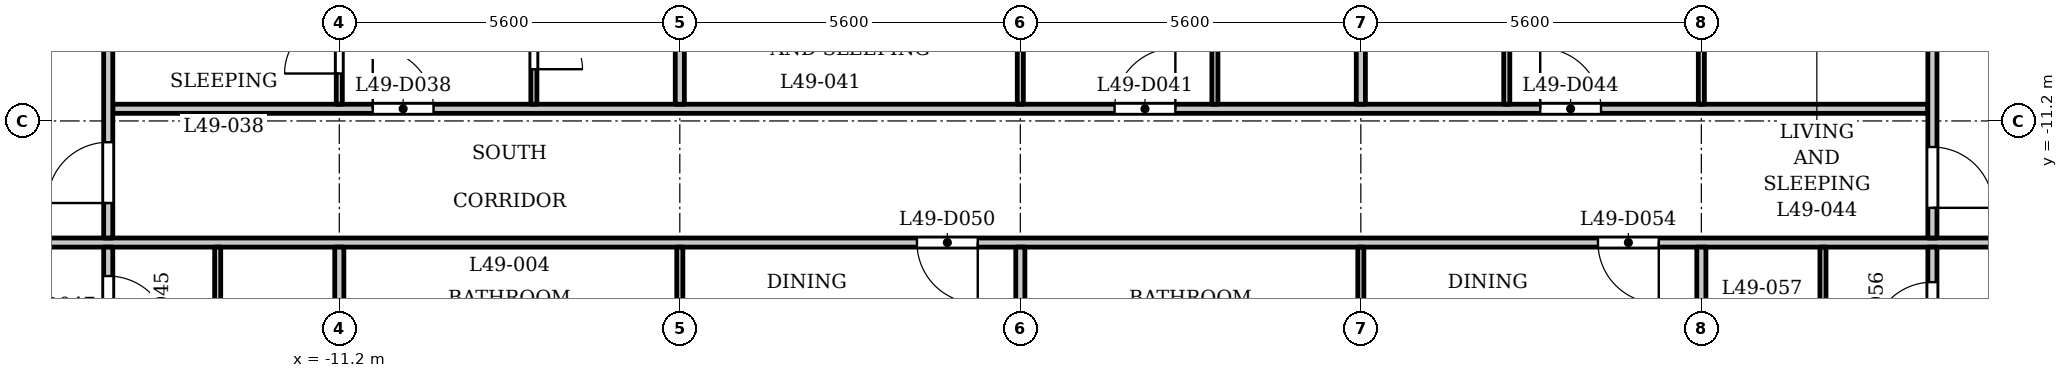
"""IFC4 building model, lengths in metres.
Left out: names, types, materials, properties, quantities, classifications, styles, units other than length and angle.
Written with IfcOpenShell. Run it as: python <this file> out.ifc"""

import sys

from ifc_helpers import new_model, si_unit, direction, frame, frame_2d, origin, place, context, subcontext, project, spatial, rectangle, extrude, element, fill, save


model = new_model("IFC4")
c1 = context("Model", 3, precision=1e-05, world=origin(), true_north=direction((0.0, 1.0)))
c2 = subcontext(c1, "Body", "Model", "MODEL_VIEW")
j1 = project(units=[si_unit("LENGTHUNIT", "METRE"), si_unit("PLANEANGLEUNIT", "RADIAN")], contexts=[c1])
p1 = place(None, origin())
s1 = spatial("IfcSite", under=j1, at=p1, CompositionType="ELEMENT")
p2 = place(p1, origin())
s2 = spatial("IfcBuilding", under=s1, at=p2, CompositionType="ELEMENT")
p3 = place(p2, frame((0.0, 0.0, 192.4)))
s3 = spatial("IfcBuildingStorey", under=s2, at=p3, CompositionType="ELEMENT", Elevation=192.4)
p4 = place(p3, frame((-17.4, -13.2, 0.0), z_axis=(0.0, 0.0, 1.0), x_axis=(1.0, 0.0, 0.0)))
e1 = element("IfcWall", 1, at=p4, inside=s3, PredefinedType="PARTITIONING", context=c2, shape_type="SweptSolid", body=[
    extrude(rectangle(XDim=34.8, YDim=0.15, at=frame_2d((17.4, 0.0))), origin(), (0.0, 0.0, 1.0), 3.2),
])
p5 = place(p4, frame((0.15, 0.0, 0.0)))
e2 = element("IfcOpeningElement", 2, at=p5, cuts=e1, PredefinedType="OPENING", context=c2, shape_type="SweptSolid", body=[
    extrude(rectangle(XDim=1.0, YDim=2.1, at=frame_2d((0.5, 1.05))), frame((0.0, 0.085, 0.0), z_axis=(0.0, -1.0, 0.0), x_axis=(1.0, 0.0, 0.0)), (0.0, 0.0, 1.0), 0.17),
])
p6 = place(p4, frame((33.55, 0.0, 0.0)))
e3 = element("IfcOpeningElement", 3, at=p6, cuts=e1, PredefinedType="OPENING", context=c2, shape_type="SweptSolid", body=[
    extrude(rectangle(XDim=1.0, YDim=2.1, at=frame_2d((0.5, 1.05))), frame((0.0, 0.085, 0.0), z_axis=(0.0, -1.0, 0.0), x_axis=(1.0, 0.0, 0.0)), (0.0, 0.0, 1.0), 0.17),
])
p7 = place(p4, frame((15.7, 0.0, 0.0)))
e4 = element("IfcOpeningElement", 4, at=p7, cuts=e1, PredefinedType="OPENING", context=c2, shape_type="SweptSolid", body=[
    extrude(rectangle(XDim=1.0, YDim=2.1, at=frame_2d((0.5, 1.05))), frame((0.0, 0.085, 0.0), z_axis=(0.0, -1.0, 0.0), x_axis=(1.0, 0.0, 0.0)), (0.0, 0.0, 1.0), 0.17),
])
p8 = place(p4, frame((26.9, 0.0, 0.0)))
e5 = element("IfcOpeningElement", 5, at=p8, cuts=e1, PredefinedType="OPENING", context=c2, shape_type="SweptSolid", body=[
    extrude(rectangle(XDim=1.0, YDim=2.1, at=frame_2d((0.5, 1.05))), frame((0.0, 0.085, 0.0), z_axis=(0.0, -1.0, 0.0), x_axis=(1.0, 0.0, 0.0)), (0.0, 0.0, 1.0), 0.17),
])
p9 = place(p3, frame((-14.925, -11.0, 0.0), z_axis=(0.0, 0.0, 1.0), x_axis=(1.0, 0.0, 0.0)))
e6 = element("IfcWall", 6, at=p9, inside=s3, PredefinedType="PARTITIONING", context=c2, shape_type="SweptSolid", body=[
    extrude(rectangle(XDim=29.85, YDim=0.15, at=frame_2d((14.925, 0.0))), origin(), (0.0, 0.0, 1.0), 3.2),
])
p10 = place(p9, frame((4.275, 0.0, 0.0)))
e7 = element("IfcOpeningElement", 7, at=p10, cuts=e6, PredefinedType="OPENING", context=c2, shape_type="SweptSolid", body=[
    extrude(rectangle(XDim=1.0, YDim=2.1, at=frame_2d((0.5, 1.05))), frame((0.0, 0.085, 0.0), z_axis=(0.0, -1.0, 0.0), x_axis=(1.0, 0.0, 0.0)), (0.0, 0.0, 1.0), 0.17),
])
p11 = place(p9, frame((16.475, 0.0, 0.0)))
e8 = element("IfcOpeningElement", 8, at=p11, cuts=e6, PredefinedType="OPENING", context=c2, shape_type="SweptSolid", body=[
    extrude(rectangle(XDim=1.0, YDim=2.1, at=frame_2d((0.5, 1.05))), frame((0.0, 0.085, 0.0), z_axis=(0.0, -1.0, 0.0), x_axis=(1.0, 0.0, 0.0)), (0.0, 0.0, 1.0), 0.17),
])
p12 = place(p9, frame((23.475, 0.0, 0.0)))
e9 = element("IfcOpeningElement", 9, at=p12, cuts=e6, PredefinedType="OPENING", context=c2, shape_type="SweptSolid", body=[
    extrude(rectangle(XDim=1.0, YDim=2.1, at=frame_2d((0.5, 1.05))), frame((0.0, 0.085, 0.0), z_axis=(0.0, -1.0, 0.0), x_axis=(1.0, 0.0, 0.0)), (0.0, 0.0, 1.0), 0.17),
])
p13 = place(p3, frame((-15.0, -15.325, 0.0), z_axis=(0.0, 0.0, 1.0), x_axis=(0.0, 1.0, 0.0)))
e10 = element("IfcWall", 10, at=p13, inside=s3, PredefinedType="PARTITIONING", context=c2, shape_type="SweptSolid", body=[
    extrude(rectangle(XDim=2.05, YDim=0.15, at=frame_2d((1.025, 0.0))), origin(), (0.0, 0.0, 1.0), 3.2),
])
p14 = place(p13, frame((0.574, 0.0, 0.0)))
e11 = element("IfcOpeningElement", 11, at=p14, cuts=e10, PredefinedType="OPENING", context=c2, shape_type="SweptSolid", body=[
    extrude(rectangle(XDim=1.0, YDim=2.1, at=frame_2d((0.5, 1.05))), frame((0.0, 0.085, 0.0), z_axis=(0.0, -1.0, 0.0), x_axis=(1.0, 0.0, 0.0)), (0.0, 0.0, 1.0), 0.17),
])
p15 = place(p3, frame((-15.0, -13.125, 0.0), z_axis=(0.0, 0.0, 1.0), x_axis=(0.0, 1.0, 0.0)))
e12 = element("IfcWall", 12, at=p15, inside=s3, PredefinedType="PARTITIONING", context=c2, shape_type="SweptSolid", body=[
    extrude(rectangle(XDim=6.356, YDim=0.15, at=frame_2d((3.178, 0.0))), origin(), (0.0, 0.0, 1.0), 3.2),
])
p16 = place(p15, frame((0.575, 0.0, 0.0)))
e13 = element("IfcOpeningElement", 13, at=p16, cuts=e12, PredefinedType="OPENING", context=c2, shape_type="SweptSolid", body=[
    extrude(rectangle(XDim=1.0, YDim=2.1, at=frame_2d((0.5, 1.05))), frame((0.0, 0.085, 0.0), z_axis=(0.0, -1.0, 0.0), x_axis=(1.0, 0.0, 0.0)), (0.0, 0.0, 1.0), 0.17),
])
p17 = place(p3, frame((-13.2, -15.55, 0.0), z_axis=(0.0, 0.0, 1.0), x_axis=(0.0, 1.0, 0.0)))
e14 = element("IfcWall", 14, at=p17, inside=s3, PredefinedType="PARTITIONING", context=c2, shape_type="SweptSolid", body=[
    extrude(rectangle(XDim=2.275, YDim=0.1, at=frame_2d((1.138, 0.0))), origin(), (0.0, 0.0, 1.0), 3.2),
])
p18 = place(p3, frame((-11.2, -10.925, 0.0), z_axis=(0.0, 0.0, 1.0), x_axis=(0.0, 1.0, 0.0)))
e15 = element("IfcWall", 15, at=p18, inside=s3, PredefinedType="PARTITIONING", context=c2, shape_type="SweptSolid", body=[
    extrude(rectangle(XDim=3.605, YDim=0.1, at=frame_2d((1.802, 0.0))), origin(), (0.0, 0.0, 1.0), 3.2),
])
p19 = place(p18, frame((0.505, 0.0, 0.0)))
e16 = element("IfcOpeningElement", 16, at=p19, cuts=e15, PredefinedType="OPENING", context=c2, shape_type="SweptSolid", body=[
    extrude(rectangle(XDim=0.9, YDim=2.1, at=frame_2d((0.45, 1.05))), frame((0.0, 0.06, 0.0), z_axis=(0.0, -1.0, 0.0), x_axis=(1.0, 0.0, 0.0)), (0.0, 0.0, 1.0), 0.12),
])
p20 = place(p3, frame((-11.2, -15.55, 0.0), z_axis=(0.0, 0.0, 1.0), x_axis=(0.0, 1.0, 0.0)))
e17 = element("IfcWall", 17, at=p20, inside=s3, PredefinedType="PARTITIONING", context=c2, shape_type="SweptSolid", body=[
    extrude(rectangle(XDim=2.275, YDim=0.15, at=frame_2d((1.138, 0.0))), origin(), (0.0, 0.0, 1.0), 3.2),
])
p21 = place(p3, frame((-8.0, -10.925, 0.0), z_axis=(0.0, 0.0, 1.0), x_axis=(0.0, 1.0, 0.0)))
e18 = element("IfcWall", 18, at=p21, inside=s3, PredefinedType="PARTITIONING", context=c2, shape_type="SweptSolid", body=[
    extrude(rectangle(XDim=3.605, YDim=0.1, at=frame_2d((1.802, 0.0))), origin(), (0.0, 0.0, 1.0), 3.2),
])
p22 = place(p21, frame((0.576, 0.0, 0.0)))
e19 = element("IfcOpeningElement", 19, at=p22, cuts=e18, PredefinedType="OPENING", context=c2, shape_type="SweptSolid", body=[
    extrude(rectangle(XDim=0.8, YDim=2.1, at=frame_2d((0.4, 1.05))), frame((0.0, 0.06, 0.0), z_axis=(0.0, -1.0, 0.0), x_axis=(1.0, 0.0, 0.0)), (0.0, 0.0, 1.0), 0.12),
])
p23 = place(p3, frame((-5.6, -15.55, 0.0), z_axis=(0.0, 0.0, 1.0), x_axis=(0.0, 1.0, 0.0)))
e20 = element("IfcWall", 20, at=p23, inside=s3, PredefinedType="PARTITIONING", context=c2, shape_type="SweptSolid", body=[
    extrude(rectangle(XDim=2.275, YDim=0.1, at=frame_2d((1.138, 0.0))), origin(), (0.0, 0.0, 1.0), 3.2),
])
p24 = place(p3, frame((-5.6, -10.925, 0.0), z_axis=(0.0, 0.0, 1.0), x_axis=(0.0, 1.0, 0.0)))
e21 = element("IfcWall", 21, at=p24, inside=s3, PredefinedType="PARTITIONING", context=c2, shape_type="SweptSolid", body=[
    extrude(rectangle(XDim=3.605, YDim=0.15, at=frame_2d((1.802, 0.0))), origin(), (0.0, 0.0, 1.0), 3.2),
])
p25 = place(p3, frame((0.0, -10.925, 0.0), z_axis=(0.0, 0.0, 1.0), x_axis=(0.0, 1.0, 0.0)))
e22 = element("IfcWall", 22, at=p25, inside=s3, PredefinedType="PARTITIONING", context=c2, shape_type="SweptSolid", body=[
    extrude(rectangle(XDim=3.605, YDim=0.1, at=frame_2d((1.802, 0.0))), origin(), (0.0, 0.0, 1.0), 3.2),
])
p26 = place(p25, frame((1.005, 0.0, 0.0)))
e23 = element("IfcOpeningElement", 23, at=p26, cuts=e22, PredefinedType="OPENING", context=c2, shape_type="SweptSolid", body=[
    extrude(rectangle(XDim=0.9, YDim=2.1, at=frame_2d((0.45, 1.05))), frame((0.0, 0.06, 0.0), z_axis=(0.0, -1.0, 0.0), x_axis=(1.0, 0.0, 0.0)), (0.0, 0.0, 1.0), 0.12),
])
p27 = place(p3, frame((0.0, -15.55, 0.0), z_axis=(0.0, 0.0, 1.0), x_axis=(0.0, 1.0, 0.0)))
e24 = element("IfcWall", 24, at=p27, inside=s3, PredefinedType="PARTITIONING", context=c2, shape_type="SweptSolid", body=[
    extrude(rectangle(XDim=2.275, YDim=0.15, at=frame_2d((1.138, 0.0))), origin(), (0.0, 0.0, 1.0), 3.2),
])
p28 = place(p3, frame((3.2, -10.925, 0.0), z_axis=(0.0, 0.0, 1.0), x_axis=(0.0, 1.0, 0.0)))
e25 = element("IfcWall", 25, at=p28, inside=s3, PredefinedType="PARTITIONING", context=c2, shape_type="SweptSolid", body=[
    extrude(rectangle(XDim=3.605, YDim=0.1, at=frame_2d((1.802, 0.0))), origin(), (0.0, 0.0, 1.0), 3.2),
])
p29 = place(p28, frame((2.326, 0.0, 0.0)))
e26 = element("IfcOpeningElement", 26, at=p29, cuts=e25, PredefinedType="OPENING", context=c2, shape_type="SweptSolid", body=[
    extrude(rectangle(XDim=0.8, YDim=2.1, at=frame_2d((0.4, 1.05))), frame((0.0, 0.06, 0.0), z_axis=(0.0, -1.0, 0.0), x_axis=(1.0, 0.0, 0.0)), (0.0, 0.0, 1.0), 0.12),
])
p30 = place(p3, frame((5.6, -15.55, 0.0), z_axis=(0.0, 0.0, 1.0), x_axis=(0.0, 1.0, 0.0)))
e27 = element("IfcWall", 27, at=p30, inside=s3, PredefinedType="PARTITIONING", context=c2, shape_type="SweptSolid", body=[
    extrude(rectangle(XDim=2.275, YDim=0.1, at=frame_2d((1.138, 0.0))), origin(), (0.0, 0.0, 1.0), 3.2),
])
p31 = place(p3, frame((5.6, -10.925, 0.0), z_axis=(0.0, 0.0, 1.0), x_axis=(0.0, 1.0, 0.0)))
e28 = element("IfcWall", 28, at=p31, inside=s3, PredefinedType="PARTITIONING", context=c2, shape_type="SweptSolid", body=[
    extrude(rectangle(XDim=3.605, YDim=0.15, at=frame_2d((1.802, 0.0))), origin(), (0.0, 0.0, 1.0), 3.2),
])
p32 = place(p3, frame((8.0, -10.925, 0.0), z_axis=(0.0, 0.0, 1.0), x_axis=(0.0, 1.0, 0.0)))
e29 = element("IfcWall", 29, at=p32, inside=s3, PredefinedType="PARTITIONING", context=c2, shape_type="SweptSolid", body=[
    extrude(rectangle(XDim=3.605, YDim=0.1, at=frame_2d((1.802, 0.0))), origin(), (0.0, 0.0, 1.0), 3.2),
])
p33 = place(p32, frame((2.355, 0.0, 0.0)))
e30 = element("IfcOpeningElement", 30, at=p33, cuts=e29, PredefinedType="OPENING", context=c2, shape_type="SweptSolid", body=[
    extrude(rectangle(XDim=0.8, YDim=2.1, at=frame_2d((0.4, 1.05))), frame((0.0, 0.06, 0.0), z_axis=(0.0, -1.0, 0.0), x_axis=(1.0, 0.0, 0.0)), (0.0, 0.0, 1.0), 0.12),
])
p34 = place(p3, frame((11.2, -10.925, 0.0), z_axis=(0.0, 0.0, 1.0), x_axis=(0.0, 1.0, 0.0)))
e31 = element("IfcWall", 31, at=p34, inside=s3, PredefinedType="PARTITIONING", context=c2, shape_type="SweptSolid", body=[
    extrude(rectangle(XDim=3.605, YDim=0.1, at=frame_2d((1.802, 0.0))), origin(), (0.0, 0.0, 1.0), 3.2),
])
p35 = place(p34, frame((1.076, 0.0, 0.0)))
e32 = element("IfcOpeningElement", 32, at=p35, cuts=e31, PredefinedType="OPENING", context=c2, shape_type="SweptSolid", body=[
    extrude(rectangle(XDim=0.9, YDim=2.1, at=frame_2d((0.45, 1.05))), frame((0.0, 0.06, 0.0), z_axis=(0.0, -1.0, 0.0), x_axis=(1.0, 0.0, 0.0)), (0.0, 0.0, 1.0), 0.12),
])
p36 = place(p3, frame((11.2, -15.55, 0.0), z_axis=(0.0, 0.0, 1.0), x_axis=(0.0, 1.0, 0.0)))
e33 = element("IfcWall", 33, at=p36, inside=s3, PredefinedType="PARTITIONING", context=c2, shape_type="SweptSolid", body=[
    extrude(rectangle(XDim=2.275, YDim=0.15, at=frame_2d((1.138, 0.0))), origin(), (0.0, 0.0, 1.0), 3.2),
])
p37 = place(p3, frame((13.2, -15.55, 0.0), z_axis=(0.0, 0.0, 1.0), x_axis=(0.0, 1.0, 0.0)))
e34 = element("IfcWall", 34, at=p37, inside=s3, PredefinedType="PARTITIONING", context=c2, shape_type="SweptSolid", body=[
    extrude(rectangle(XDim=2.275, YDim=0.1, at=frame_2d((1.138, 0.0))), origin(), (0.0, 0.0, 1.0), 3.2),
])
p38 = place(p3, frame((15.0, -15.325, 0.0), z_axis=(0.0, 0.0, 1.0), x_axis=(0.0, 1.0, 0.0)))
e35 = element("IfcWall", 35, at=p38, inside=s3, PredefinedType="PARTITIONING", context=c2, shape_type="SweptSolid", body=[
    extrude(rectangle(XDim=2.05, YDim=0.15, at=frame_2d((1.025, 0.0))), origin(), (0.0, 0.0, 1.0), 3.2),
])
p39 = place(p38, frame((0.474, 0.0, 0.0)))
e36 = element("IfcOpeningElement", 36, at=p39, cuts=e35, PredefinedType="OPENING", context=c2, shape_type="SweptSolid", body=[
    extrude(rectangle(XDim=1.0, YDim=2.1, at=frame_2d((0.5, 1.05))), frame((0.0, 0.085, 0.0), z_axis=(0.0, -1.0, 0.0), x_axis=(1.0, 0.0, 0.0)), (0.0, 0.0, 1.0), 0.17),
])
p40 = place(p3, frame((15.0, -13.125, 0.0), z_axis=(0.0, 0.0, 1.0), x_axis=(0.0, 1.0, 0.0)))
e37 = element("IfcWall", 37, at=p40, inside=s3, PredefinedType="PARTITIONING", context=c2, shape_type="SweptSolid", body=[
    extrude(rectangle(XDim=6.356, YDim=0.15, at=frame_2d((3.178, 0.0))), origin(), (0.0, 0.0, 1.0), 3.2),
])
p41 = place(p40, frame((0.496, 0.0, 0.0)))
e38 = element("IfcOpeningElement", 38, at=p41, cuts=e37, PredefinedType="OPENING", context=c2, shape_type="SweptSolid", body=[
    extrude(rectangle(XDim=1.0, YDim=2.1, at=frame_2d((0.5, 1.05))), frame((0.0, 0.085, 0.0), z_axis=(0.0, -1.0, 0.0), x_axis=(1.0, 0.0, 0.0)), (0.0, 0.0, 1.0), 0.17),
])
p42 = place(p16, origin())
e39 = element("IfcDoor", 39, at=p42, inside=s3, OperationType="SINGLE_SWING_RIGHT", PredefinedType="DOOR", context=c2, shape_type="SweptSolid", body=[
    extrude(rectangle(XDim=1.0, YDim=2.1, at=frame_2d((0.5, 1.05))), frame((0.0, 0.025, 0.0), z_axis=(0.0, -1.0, 0.0), x_axis=(1.0, 0.0, 0.0)), (0.0, 0.0, 1.0), 0.05),
])
fill(e13, e39)
p43 = place(p41, origin())
e40 = element("IfcDoor", 40, at=p43, inside=s3, OperationType="SINGLE_SWING_LEFT", PredefinedType="DOOR", context=c2, shape_type="SweptSolid", body=[
    extrude(rectangle(XDim=1.0, YDim=2.1, at=frame_2d((0.5, 1.05))), frame((0.0, 0.025, 0.0), z_axis=(0.0, -1.0, 0.0), x_axis=(1.0, 0.0, 0.0)), (0.0, 0.0, 1.0), 0.05),
])
fill(e38, e40)
p44 = place(p10, origin())
e41 = element("IfcDoor", 41, at=p44, inside=s3, OperationType="SINGLE_SWING_RIGHT", PredefinedType="DOOR", context=c2, shape_type="SweptSolid", body=[
    extrude(rectangle(XDim=1.0, YDim=2.1, at=frame_2d((0.5, 1.05))), frame((0.0, 0.025, 0.0), z_axis=(0.0, -1.0, 0.0), x_axis=(1.0, 0.0, 0.0)), (0.0, 0.0, 1.0), 0.05),
])
fill(e7, e41)
p45 = place(p22, origin())
e42 = element("IfcDoor", 42, at=p45, inside=s3, OperationType="SINGLE_SWING_LEFT", PredefinedType="DOOR", context=c2, shape_type="SweptSolid", body=[
    extrude(rectangle(XDim=0.8, YDim=2.1, at=frame_2d((0.4, 1.05))), frame((0.0, 0.025, 0.0), z_axis=(0.0, -1.0, 0.0), x_axis=(1.0, 0.0, 0.0)), (0.0, 0.0, 1.0), 0.05),
])
fill(e19, e42)
p46 = place(p19, origin())
e43 = element("IfcDoor", 43, at=p46, inside=s3, OperationType="SINGLE_SWING_RIGHT", PredefinedType="DOOR", context=c2, shape_type="SweptSolid", body=[
    extrude(rectangle(XDim=0.9, YDim=2.1, at=frame_2d((0.45, 1.05))), frame((0.0, 0.025, 0.0), z_axis=(0.0, -1.0, 0.0), x_axis=(1.0, 0.0, 0.0)), (0.0, 0.0, 1.0), 0.05),
])
fill(e16, e43)
p47 = place(p11, origin())
e44 = element("IfcDoor", 44, at=p47, inside=s3, OperationType="SINGLE_SWING_LEFT", PredefinedType="DOOR", context=c2, shape_type="SweptSolid", body=[
    extrude(rectangle(XDim=1.0, YDim=2.1, at=frame_2d((0.5, 1.05))), frame((0.0, 0.025, 0.0), z_axis=(0.0, -1.0, 0.0), x_axis=(1.0, 0.0, 0.0)), (0.0, 0.0, 1.0), 0.05),
])
fill(e8, e44)
p48 = place(p12, origin())
e45 = element("IfcDoor", 45, at=p48, inside=s3, OperationType="SINGLE_SWING_RIGHT", PredefinedType="DOOR", context=c2, shape_type="SweptSolid", body=[
    extrude(rectangle(XDim=1.0, YDim=2.1, at=frame_2d((0.5, 1.05))), frame((0.0, 0.025, 0.0), z_axis=(0.0, -1.0, 0.0), x_axis=(1.0, 0.0, 0.0)), (0.0, 0.0, 1.0), 0.05),
])
fill(e9, e45)
p49 = place(p14, origin())
e46 = element("IfcDoor", 46, at=p49, inside=s3, OperationType="SINGLE_SWING_LEFT", PredefinedType="DOOR", context=c2, shape_type="SweptSolid", body=[
    extrude(rectangle(XDim=1.0, YDim=2.1, at=frame_2d((0.5, 1.05))), frame((0.0, 0.025, 0.0), z_axis=(0.0, -1.0, 0.0), x_axis=(1.0, 0.0, 0.0)), (0.0, 0.0, 1.0), 0.05),
])
fill(e11, e46)
p50 = place(p7, origin())
e47 = element("IfcDoor", 47, at=p50, inside=s3, OperationType="SINGLE_SWING_RIGHT", PredefinedType="DOOR", context=c2, shape_type="SweptSolid", body=[
    extrude(rectangle(XDim=1.0, YDim=2.1, at=frame_2d((0.5, 1.05))), frame((0.0, 0.025, 0.0), z_axis=(0.0, -1.0, 0.0), x_axis=(1.0, 0.0, 0.0)), (0.0, 0.0, 1.0), 0.05),
])
fill(e4, e47)
p51 = place(p8, origin())
e48 = element("IfcDoor", 48, at=p51, inside=s3, OperationType="SINGLE_SWING_RIGHT", PredefinedType="DOOR", context=c2, shape_type="SweptSolid", body=[
    extrude(rectangle(XDim=1.0, YDim=2.1, at=frame_2d((0.5, 1.05))), frame((0.0, 0.025, 0.0), z_axis=(0.0, -1.0, 0.0), x_axis=(1.0, 0.0, 0.0)), (0.0, 0.0, 1.0), 0.05),
])
fill(e5, e48)
p52 = place(p39, origin())
e49 = element("IfcDoor", 49, at=p52, inside=s3, OperationType="SINGLE_SWING_RIGHT", PredefinedType="DOOR", context=c2, shape_type="SweptSolid", body=[
    extrude(rectangle(XDim=1.0, YDim=2.1, at=frame_2d((0.5, 1.05))), frame((0.0, 0.025, 0.0), z_axis=(0.0, -1.0, 0.0), x_axis=(1.0, 0.0, 0.0)), (0.0, 0.0, 1.0), 0.05),
])
fill(e36, e49)
save(model, sys.argv[1])
